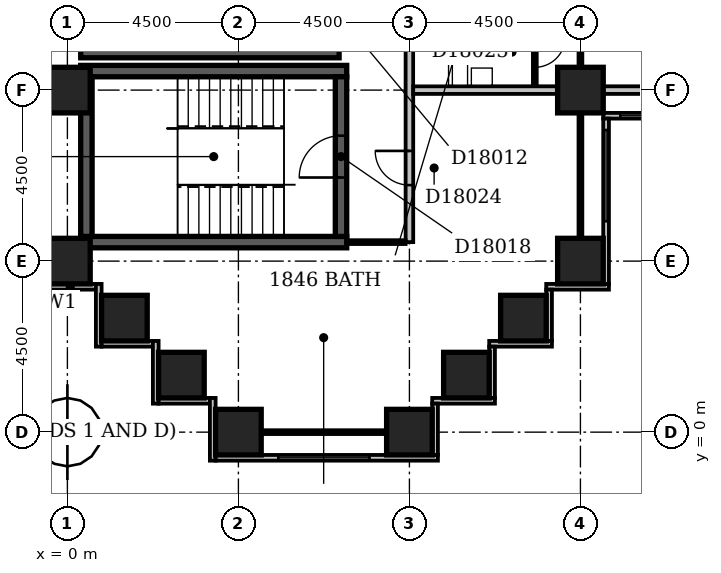
"""IFC4 building model, lengths in metres.
Left out: names, types, materials, properties, quantities, classifications, styles, units other than length and angle.
Written with IfcOpenShell. Run it as: python <this file> out.ifc"""

import sys

from ifc_helpers import new_model, si_unit, direction, frame, frame_2d, origin, origin_2d, place, context, subcontext, project, spatial, rectangle, extrude, element, fill, save


model = new_model("IFC4")
c1 = context("Model", 3, precision=1e-05, world=origin(), true_north=direction((0.0, 1.0)))
c2 = subcontext(c1, "Body", "Model", "MODEL_VIEW")
j1 = project(units=[si_unit("LENGTHUNIT", "METRE"), si_unit("PLANEANGLEUNIT", "RADIAN")], contexts=[c1])
p1 = place(None, origin())
s1 = spatial("IfcSite", under=j1, at=p1, CompositionType="ELEMENT")
p2 = place(p1, origin())
s2 = spatial("IfcBuilding", under=s1, at=p2, CompositionType="ELEMENT")
p3 = place(p2, frame((0.0, 0.0, 75.8)))
s3 = spatial("IfcBuildingStorey", under=s2, at=p3, CompositionType="ELEMENT", Elevation=75.8)
for number, where, z_axis, x_axis in (
    (1, (0.35, 5.0, -0.3), (0.0, 0.0, 1.0), (1.0, 0.0, 0.0)),
    (2, (0.35, 9.5, -0.3), (0.0, 0.0, 1.0), (1.0, 0.0, 0.0)),
):
    element("IfcWall", number, at=place(p3, frame(where, z_axis=z_axis, x_axis=x_axis)), inside=s3, PredefinedType="SHEAR", context=c2, shape_type="SweptSolid", body=[
        extrude(rectangle(XDim=7.0, YDim=0.3, at=frame_2d((3.5, 0.0))), origin(), (0.0, 0.0, 1.0), 3.6),
    ])
p4 = place(p3, frame((0.35, 10.0, -0.3), z_axis=(0.0, 0.0, 1.0), x_axis=(1.0, 0.0, 0.0)))
e3 = element("IfcWall", 3, at=p4, inside=s3, PredefinedType="SHEAR", context=c2, shape_type="SweptSolid", body=[
    extrude(rectangle(XDim=6.8, YDim=0.3, at=frame_2d((3.4, 0.0))), origin(), (0.0, 0.0, 1.0), 3.6),
])
p5 = place(p3, frame((0.5, 5.15, -0.3), z_axis=(0.0, 0.0, 1.0), x_axis=(0.0, 1.0, 0.0)))
e4 = element("IfcWall", 4, at=p5, inside=s3, PredefinedType="SHEAR", context=c2, shape_type="SweptSolid", body=[
    extrude(rectangle(XDim=4.2, YDim=0.3, at=frame_2d((2.1, 0.0))), origin(), (0.0, 0.0, 1.0), 3.6),
])
p6 = place(p3, frame((7.2, 5.15, -0.3), z_axis=(0.0, 0.0, 1.0), x_axis=(0.0, 1.0, 0.0)))
e5 = element("IfcWall", 5, at=p6, inside=s3, PredefinedType="SHEAR", context=c2, shape_type="SweptSolid", body=[
    extrude(rectangle(XDim=4.2, YDim=0.3, at=frame_2d((2.1, 0.0))), origin(), (0.0, 0.0, 1.0), 3.6),
])
p7 = place(p6, frame((1.55, 0.0, 0.3)))
e6 = element("IfcOpeningElement", 6, at=p7, cuts=e5, PredefinedType="OPENING", context=c2, shape_type="SweptSolid", body=[
    extrude(rectangle(XDim=1.1, YDim=2.1, at=frame_2d((0.55, 1.05))), frame((0.0, 0.162, 0.0), z_axis=(0.0, -1.0, 0.0), x_axis=(1.0, 0.0, 0.0)), (0.0, 0.0, 1.0), 0.324),
])
for number, where, z_axis, x_axis in (
    (7, (4.5, 0.0, -0.3), (0.0, 0.0, 1.0), (1.0, 0.0, 0.0)),
    (8, (9.0, 0.0, -0.3), (0.0, 0.0, 1.0), (1.0, 0.0, 0.0)),
    (9, (3.0, 1.5, -0.3), (0.0, 0.0, 1.0), (1.0, 0.0, 0.0)),
    (10, (10.5, 1.5, -0.3), (0.0, 0.0, 1.0), (1.0, 0.0, 0.0)),
    (11, (1.5, 3.0, -0.3), (0.0, 0.0, 1.0), (1.0, 0.0, 0.0)),
    (12, (12.0, 3.0, -0.3), (0.0, 0.0, 1.0), (1.0, 0.0, 0.0)),
    (13, (0.0, 4.5, -0.3), (0.0, 0.0, 1.0), (1.0, 0.0, 0.0)),
    (14, (13.5, 4.5, -0.3), (0.0, 0.0, 1.0), (1.0, 0.0, 0.0)),
    (15, (0.0, 9.0, -0.3), (0.0, 0.0, 1.0), (1.0, 0.0, 0.0)),
    (16, (13.5, 9.0, -0.3), (0.0, 0.0, 1.0), (1.0, 0.0, 0.0)),
):
    element("IfcColumn", number, at=place(p3, frame(where, z_axis=z_axis, x_axis=x_axis)), inside=s3, PredefinedType="COLUMN", context=c2, shape_type="SweptSolid", body=[
        extrude(rectangle(XDim=1.2, YDim=1.2, at=origin_2d()), origin(), (0.0, 0.0, 1.0), 3.6),
    ])
p8 = place(p3, frame((9.675, -0.6, 0.0), z_axis=(0.0, 0.0, 1.0), x_axis=(0.0, 1.0, 0.0)))
e17 = element("IfcWall", 17, at=p8, inside=s3, PredefinedType="STANDARD", context=c2, shape_type="SweptSolid", body=[
    extrude(rectangle(XDim=1.35, YDim=0.15, at=frame_2d((0.675, 0.0))), origin(), (0.0, 0.0, 1.0), 2.7),
])
p9 = place(p3, frame((9.6, 0.825, 0.0), z_axis=(0.0, 0.0, 1.0), x_axis=(1.0, 0.0, 0.0)))
e18 = element("IfcWall", 18, at=p9, inside=s3, PredefinedType="STANDARD", context=c2, shape_type="SweptSolid", body=[
    extrude(rectangle(XDim=1.65, YDim=0.15, at=frame_2d((0.825, 0.0))), origin(), (0.0, 0.0, 1.0), 2.7),
])
p10 = place(p3, frame((11.175, 0.9, 0.0), z_axis=(0.0, 0.0, 1.0), x_axis=(0.0, 1.0, 0.0)))
e19 = element("IfcWall", 19, at=p10, inside=s3, PredefinedType="STANDARD", context=c2, shape_type="SweptSolid", body=[
    extrude(rectangle(XDim=1.35, YDim=0.15, at=frame_2d((0.675, 0.0))), origin(), (0.0, 0.0, 1.0), 2.7),
])
p11 = place(p3, frame((11.1, 2.325, 0.0), z_axis=(0.0, 0.0, 1.0), x_axis=(1.0, 0.0, 0.0)))
e20 = element("IfcWall", 20, at=p11, inside=s3, PredefinedType="STANDARD", context=c2, shape_type="SweptSolid", body=[
    extrude(rectangle(XDim=1.65, YDim=0.15, at=frame_2d((0.825, 0.0))), origin(), (0.0, 0.0, 1.0), 2.7),
])
p12 = place(p3, frame((12.675, 2.4, 0.0), z_axis=(0.0, 0.0, 1.0), x_axis=(0.0, 1.0, 0.0)))
e21 = element("IfcWall", 21, at=p12, inside=s3, PredefinedType="STANDARD", context=c2, shape_type="SweptSolid", body=[
    extrude(rectangle(XDim=1.35, YDim=0.15, at=frame_2d((0.675, 0.0))), origin(), (0.0, 0.0, 1.0), 2.7),
])
p13 = place(p3, frame((12.6, 3.825, 0.0), z_axis=(0.0, 0.0, 1.0), x_axis=(1.0, 0.0, 0.0)))
e22 = element("IfcWall", 22, at=p13, inside=s3, PredefinedType="STANDARD", context=c2, shape_type="SweptSolid", body=[
    extrude(rectangle(XDim=1.65, YDim=0.15, at=frame_2d((0.825, 0.0))), origin(), (0.0, 0.0, 1.0), 2.7),
])
p14 = place(p3, frame((14.175, 3.9, 0.0), z_axis=(0.0, 0.0, 1.0), x_axis=(0.0, 1.0, 0.0)))
e23 = element("IfcWall", 23, at=p14, inside=s3, PredefinedType="STANDARD", context=c2, shape_type="SweptSolid", body=[
    extrude(rectangle(XDim=4.35, YDim=0.15, at=frame_2d((2.175, 0.0))), origin(), (0.0, 0.0, 1.0), 2.7),
])
p15 = place(p14, frame((1.65, 0.0, 0.6)))
e24 = element("IfcOpeningElement", 24, at=p15, cuts=e23, PredefinedType="OPENING", context=c2, shape_type="SweptSolid", body=[
    extrude(rectangle(XDim=2.4, YDim=1.8, at=frame_2d((1.2, 0.9))), frame((0.0, 0.087, 0.0), z_axis=(0.0, -1.0, 0.0), x_axis=(1.0, 0.0, 0.0)), (0.0, 0.0, 1.0), 0.174),
])
p16 = place(p3, frame((14.1, 8.325, 0.0), z_axis=(0.0, 0.0, 1.0), x_axis=(1.0, 0.0, 0.0)))
e25 = element("IfcWall", 25, at=p16, inside=s3, PredefinedType="STANDARD", context=c2, shape_type="SweptSolid", body=[
    extrude(rectangle(XDim=4.65, YDim=0.15, at=frame_2d((2.325, 0.0))), origin(), (0.0, 0.0, 1.0), 2.7),
])
p17 = place(p16, frame((0.45, 0.0, 0.6)))
e26 = element("IfcOpeningElement", 26, at=p17, cuts=e25, PredefinedType="OPENING", context=c2, shape_type="SweptSolid", body=[
    extrude(rectangle(XDim=2.4, YDim=1.8, at=frame_2d((1.2, 0.9))), frame((0.0, 0.087, 0.0), z_axis=(0.0, -1.0, 0.0), x_axis=(1.0, 0.0, 0.0)), (0.0, 0.0, 1.0), 0.174),
])
p18 = place(p3, frame((-0.6, 3.825, 0.0), z_axis=(0.0, 0.0, 1.0), x_axis=(1.0, 0.0, 0.0)))
e27 = element("IfcWall", 27, at=p18, inside=s3, PredefinedType="STANDARD", context=c2, shape_type="SweptSolid", body=[
    extrude(rectangle(XDim=1.35, YDim=0.15, at=frame_2d((0.675, 0.0))), origin(), (0.0, 0.0, 1.0), 2.7),
])
p19 = place(p3, frame((0.825, 3.9, 0.0), z_axis=(0.0, 0.0, 1.0), x_axis=(0.0, -1.0, 0.0)))
e28 = element("IfcWall", 28, at=p19, inside=s3, PredefinedType="STANDARD", context=c2, shape_type="SweptSolid", body=[
    extrude(rectangle(XDim=1.65, YDim=0.15, at=frame_2d((0.825, 0.0))), origin(), (0.0, 0.0, 1.0), 2.7),
])
p20 = place(p3, frame((0.9, 2.325, 0.0), z_axis=(0.0, 0.0, 1.0), x_axis=(1.0, 0.0, 0.0)))
e29 = element("IfcWall", 29, at=p20, inside=s3, PredefinedType="STANDARD", context=c2, shape_type="SweptSolid", body=[
    extrude(rectangle(XDim=1.35, YDim=0.15, at=frame_2d((0.675, 0.0))), origin(), (0.0, 0.0, 1.0), 2.7),
])
p21 = place(p3, frame((2.325, 2.4, 0.0), z_axis=(0.0, 0.0, 1.0), x_axis=(0.0, -1.0, 0.0)))
e30 = element("IfcWall", 30, at=p21, inside=s3, PredefinedType="STANDARD", context=c2, shape_type="SweptSolid", body=[
    extrude(rectangle(XDim=1.65, YDim=0.15, at=frame_2d((0.825, 0.0))), origin(), (0.0, 0.0, 1.0), 2.7),
])
p22 = place(p3, frame((2.4, 0.825, 0.0), z_axis=(0.0, 0.0, 1.0), x_axis=(1.0, 0.0, 0.0)))
e31 = element("IfcWall", 31, at=p22, inside=s3, PredefinedType="STANDARD", context=c2, shape_type="SweptSolid", body=[
    extrude(rectangle(XDim=1.35, YDim=0.15, at=frame_2d((0.675, 0.0))), origin(), (0.0, 0.0, 1.0), 2.7),
])
p23 = place(p3, frame((3.825, 0.9, 0.0), z_axis=(0.0, 0.0, 1.0), x_axis=(0.0, -1.0, 0.0)))
e32 = element("IfcWall", 32, at=p23, inside=s3, PredefinedType="STANDARD", context=c2, shape_type="SweptSolid", body=[
    extrude(rectangle(XDim=1.65, YDim=0.15, at=frame_2d((0.825, 0.0))), origin(), (0.0, 0.0, 1.0), 2.7),
])
p24 = place(p3, frame((3.9, -0.675, 0.0), z_axis=(0.0, 0.0, 1.0), x_axis=(1.0, 0.0, 0.0)))
e33 = element("IfcWall", 33, at=p24, inside=s3, PredefinedType="STANDARD", context=c2, shape_type="SweptSolid", body=[
    extrude(rectangle(XDim=5.85, YDim=0.15, at=frame_2d((2.925, 0.0))), origin(), (0.0, 0.0, 1.0), 2.7),
])
p25 = place(p24, frame((1.65, 0.0, 0.6)))
e34 = element("IfcOpeningElement", 34, at=p25, cuts=e33, PredefinedType="OPENING", context=c2, shape_type="SweptSolid", body=[
    extrude(rectangle(XDim=2.4, YDim=1.8, at=frame_2d((1.2, 0.9))), frame((0.0, 0.087, 0.0), z_axis=(0.0, -1.0, 0.0), x_axis=(1.0, 0.0, 0.0)), (0.0, 0.0, 1.0), 0.174),
])
p26 = place(p3, frame((5.1, 0.0, 0.0), z_axis=(0.0, 0.0, 1.0), x_axis=(1.0, 0.0, 0.0)))
e35 = element("IfcWall", 35, at=p26, inside=s3, PredefinedType="PARTITIONING", context=c2, shape_type="SweptSolid", body=[
    extrude(rectangle(XDim=3.3, YDim=0.1, at=frame_2d((1.65, 0.0))), origin(), (0.0, 0.0, 1.0), 2.7),
])
p27 = place(p3, frame((0.0, 4.4, 0.0), z_axis=(0.0, 0.0, 1.0), x_axis=(0.0, 1.0, 0.0)))
e36 = element("IfcWall", 36, at=p27, inside=s3, PredefinedType="PARTITIONING", context=c2, shape_type="SweptSolid", body=[
    extrude(rectangle(XDim=0.7, YDim=0.1, at=frame_2d((0.35, 0.0))), origin(), (0.0, 0.0, 1.0), 2.7),
])
p28 = place(p3, frame((7.349, 5.0, 0.0), z_axis=(0.0, 0.0, 1.0), x_axis=(1.0, 0.0, 0.0)))
e37 = element("IfcWall", 37, at=p28, inside=s3, PredefinedType="PARTITIONING", context=c2, shape_type="SweptSolid", body=[
    extrude(rectangle(XDim=1.551, YDim=0.1, at=frame_2d((0.775, 0.0))), origin(), (0.0, 0.0, 1.0), 3.3),
])
p29 = place(p3, frame((9.0, 5.0, 0.0), z_axis=(0.0, 0.0, 1.0), x_axis=(0.0, 1.0, 0.0)))
e38 = element("IfcWall", 38, at=p29, inside=s3, PredefinedType="PARTITIONING", context=c2, shape_type="SweptSolid", body=[
    extrude(rectangle(XDim=44.5, YDim=0.2, at=frame_2d((22.25, 0.0))), origin(), (0.0, 0.0, 1.0), 3.3),
])
p30 = place(p29, frame((17.8, 0.0, 0.0)))
e39 = element("IfcOpeningElement", 39, at=p30, cuts=e38, PredefinedType="OPENING", context=c2, shape_type="SweptSolid", body=[
    extrude(rectangle(XDim=1.0, YDim=2.1, at=frame_2d((0.5, 1.05))), frame((0.0, 0.112, 0.0), z_axis=(0.0, -1.0, 0.0), x_axis=(1.0, 0.0, 0.0)), (0.0, 0.0, 1.0), 0.224),
])
p31 = place(p29, frame((14.95, 0.0, 0.0)))
e40 = element("IfcOpeningElement", 40, at=p31, cuts=e38, PredefinedType="OPENING", context=c2, shape_type="SweptSolid", body=[
    extrude(rectangle(XDim=1.0, YDim=2.1, at=frame_2d((0.5, 1.05))), frame((0.0, 0.112, 0.0), z_axis=(0.0, -1.0, 0.0), x_axis=(1.0, 0.0, 0.0)), (0.0, 0.0, 1.0), 0.224),
])
p32 = place(p29, frame((10.45, 0.0, 0.0)))
e41 = element("IfcOpeningElement", 41, at=p32, cuts=e38, PredefinedType="OPENING", context=c2, shape_type="SweptSolid", body=[
    extrude(rectangle(XDim=1.0, YDim=2.1, at=frame_2d((0.5, 1.05))), frame((0.0, 0.112, 0.0), z_axis=(0.0, -1.0, 0.0), x_axis=(1.0, 0.0, 0.0)), (0.0, 0.0, 1.0), 0.224),
])
p33 = place(p29, frame((5.95, 0.0, 0.0)))
e42 = element("IfcOpeningElement", 42, at=p33, cuts=e38, PredefinedType="OPENING", context=c2, shape_type="SweptSolid", body=[
    extrude(rectangle(XDim=1.0, YDim=2.1, at=frame_2d((0.5, 1.05))), frame((0.0, 0.112, 0.0), z_axis=(0.0, -1.0, 0.0), x_axis=(1.0, 0.0, 0.0)), (0.0, 0.0, 1.0), 0.224),
])
p34 = place(p29, frame((35.0, 0.0, 0.0)))
e43 = element("IfcOpeningElement", 43, at=p34, cuts=e38, PredefinedType="OPENING", context=c2, shape_type="SweptSolid", body=[
    extrude(rectangle(XDim=0.9, YDim=2.1, at=frame_2d((0.45, 1.05))), frame((0.0, 0.112, 0.0), z_axis=(0.0, -1.0, 0.0), x_axis=(1.0, 0.0, 0.0)), (0.0, 0.0, 1.0), 0.224),
])
p35 = place(p29, frame((1.5, 0.0, 0.0)))
e44 = element("IfcOpeningElement", 44, at=p35, cuts=e38, PredefinedType="OPENING", context=c2, shape_type="SweptSolid", body=[
    extrude(rectangle(XDim=0.9, YDim=2.1, at=frame_2d((0.45, 1.05))), frame((0.0, 0.112, 0.0), z_axis=(0.0, -1.0, 0.0), x_axis=(1.0, 0.0, 0.0)), (0.0, 0.0, 1.0), 0.224),
])
p36 = place(p3, frame((13.5, 5.1, 0.0), z_axis=(0.0, 0.0, 1.0), x_axis=(0.0, 1.0, 0.0)))
e45 = element("IfcWall", 45, at=p36, inside=s3, PredefinedType="PARTITIONING", context=c2, shape_type="SweptSolid", body=[
    extrude(rectangle(XDim=3.3, YDim=0.1, at=frame_2d((1.65, 0.0))), origin(), (0.0, 0.0, 1.0), 2.7),
])
p37 = place(p3, frame((9.1, 9.0, 0.0), z_axis=(0.0, 0.0, 1.0), x_axis=(1.0, 0.0, 0.0)))
e46 = element("IfcWall", 46, at=p37, inside=s3, PredefinedType="PARTITIONING", context=c2, shape_type="SweptSolid", body=[
    extrude(rectangle(XDim=3.8, YDim=0.2, at=frame_2d((1.9, 0.0))), origin(), (0.0, 0.0, 1.0), 3.3),
])
p38 = place(p3, frame((14.1, 9.0, 0.0), z_axis=(0.0, 0.0, 1.0), x_axis=(1.0, 0.0, 0.0)))
e47 = element("IfcWall", 47, at=p38, inside=s3, PredefinedType="PARTITIONING", context=c2, shape_type="SweptSolid", body=[
    extrude(rectangle(XDim=3.3, YDim=0.2, at=frame_2d((1.65, 0.0))), origin(), (0.0, 0.0, 1.0), 2.7),
])
p39 = place(p3, frame((12.3, 9.1, 0.0), z_axis=(0.0, 0.0, 1.0), x_axis=(0.0, 1.0, 0.0)))
e48 = element("IfcWall", 48, at=p39, inside=s3, PredefinedType="PARTITIONING", context=c2, shape_type="SweptSolid", body=[
    extrude(rectangle(XDim=1.6, YDim=0.1, at=frame_2d((0.8, 0.0))), origin(), (0.0, 0.0, 1.0), 3.3),
])
p40 = place(p39, frame((0.5, 0.0, 0.0)))
e49 = element("IfcOpeningElement", 49, at=p40, cuts=e48, PredefinedType="OPENING", context=c2, shape_type="SweptSolid", body=[
    extrude(rectangle(XDim=0.8, YDim=2.1, at=frame_2d((0.4, 1.05))), frame((0.0, 0.062, 0.0), z_axis=(0.0, -1.0, 0.0), x_axis=(1.0, 0.0, 0.0)), (0.0, 0.0, 1.0), 0.124),
])
p41 = place(p3, frame((13.5, 9.6, 0.0), z_axis=(0.0, 0.0, 1.0), x_axis=(0.0, 1.0, 0.0)))
e50 = element("IfcWall", 50, at=p41, inside=s3, PredefinedType="PARTITIONING", context=c2, shape_type="SweptSolid", body=[
    extrude(rectangle(XDim=8.3, YDim=0.1, at=frame_2d((4.15, 0.0))), origin(), (0.0, 0.0, 1.0), 3.3),
])
p42 = place(p41, frame((5.7, 0.0, 0.0)))
e51 = element("IfcOpeningElement", 51, at=p42, cuts=e50, PredefinedType="OPENING", context=c2, shape_type="SweptSolid", body=[
    extrude(rectangle(XDim=0.9, YDim=2.1, at=frame_2d((0.45, 1.05))), frame((0.0, 0.062, 0.0), z_axis=(0.0, -1.0, 0.0), x_axis=(1.0, 0.0, 0.0)), (0.0, 0.0, 1.0), 0.124),
])
p43 = place(p41, frame((1.2, 0.0, 0.0)))
e52 = element("IfcOpeningElement", 52, at=p43, cuts=e50, PredefinedType="OPENING", context=c2, shape_type="SweptSolid", body=[
    extrude(rectangle(XDim=0.9, YDim=2.1, at=frame_2d((0.45, 1.05))), frame((0.0, 0.062, 0.0), z_axis=(0.0, -1.0, 0.0), x_axis=(1.0, 0.0, 0.0)), (0.0, 0.0, 1.0), 0.124),
])
p44 = place(p15, origin())
e53 = element("IfcWindow", 53, at=p44, inside=s3, PartitioningType="SINGLE_PANEL", PredefinedType="WINDOW", context=c2, shape_type="SweptSolid", body=[
    extrude(rectangle(XDim=2.4, YDim=1.8, at=frame_2d((1.2, 0.9))), frame((0.0, 0.03, 0.0), z_axis=(0.0, -1.0, 0.0), x_axis=(1.0, 0.0, 0.0)), (0.0, 0.0, 1.0), 0.06),
])
fill(e24, e53)
p45 = place(p17, origin())
e54 = element("IfcWindow", 54, at=p45, inside=s3, PartitioningType="SINGLE_PANEL", PredefinedType="WINDOW", context=c2, shape_type="SweptSolid", body=[
    extrude(rectangle(XDim=2.4, YDim=1.8, at=frame_2d((1.2, 0.9))), frame((0.0, 0.03, 0.0), z_axis=(0.0, -1.0, 0.0), x_axis=(1.0, 0.0, 0.0)), (0.0, 0.0, 1.0), 0.06),
])
fill(e26, e54)
p46 = place(p25, origin())
e55 = element("IfcWindow", 55, at=p46, inside=s3, PartitioningType="SINGLE_PANEL", PredefinedType="WINDOW", context=c2, shape_type="SweptSolid", body=[
    extrude(rectangle(XDim=2.4, YDim=1.8, at=frame_2d((1.2, 0.9))), frame((0.0, 0.03, 0.0), z_axis=(0.0, -1.0, 0.0), x_axis=(1.0, 0.0, 0.0)), (0.0, 0.0, 1.0), 0.06),
])
fill(e34, e55)
p47 = place(p7, origin())
e56 = element("IfcDoor", 56, at=p47, inside=s3, OperationType="SINGLE_SWING_LEFT", PredefinedType="DOOR", context=c2, shape_type="SweptSolid", body=[
    extrude(rectangle(XDim=1.1, YDim=2.1, at=frame_2d((0.55, 1.05))), frame((0.0, 0.025, 0.0), z_axis=(0.0, -1.0, 0.0), x_axis=(1.0, 0.0, 0.0)), (0.0, 0.0, 1.0), 0.05),
])
fill(e6, e56)
p48 = place(p35, frame((0.9, 0.0, 0.0), z_axis=(0.0, 0.0, 1.0), x_axis=(-1.0, 0.0, 0.0)))
e57 = element("IfcDoor", 57, at=p48, inside=s3, OperationType="SINGLE_SWING_LEFT", PredefinedType="DOOR", context=c2, shape_type="SweptSolid", body=[
    extrude(rectangle(XDim=0.9, YDim=2.1, at=frame_2d((0.45, 1.05))), frame((0.0, 0.025, 0.0), z_axis=(0.0, -1.0, 0.0), x_axis=(1.0, 0.0, 0.0)), (0.0, 0.0, 1.0), 0.05),
])
fill(e44, e57)
p49 = place(p40, origin())
e58 = element("IfcDoor", 58, at=p49, inside=s3, OperationType="SINGLE_SWING_RIGHT", PredefinedType="DOOR", context=c2, shape_type="SweptSolid", body=[
    extrude(rectangle(XDim=0.8, YDim=2.1, at=frame_2d((0.4, 1.05))), frame((0.0, 0.025, 0.0), z_axis=(0.0, -1.0, 0.0), x_axis=(1.0, 0.0, 0.0)), (0.0, 0.0, 1.0), 0.05),
])
fill(e49, e58)
save(model, sys.argv[1])
